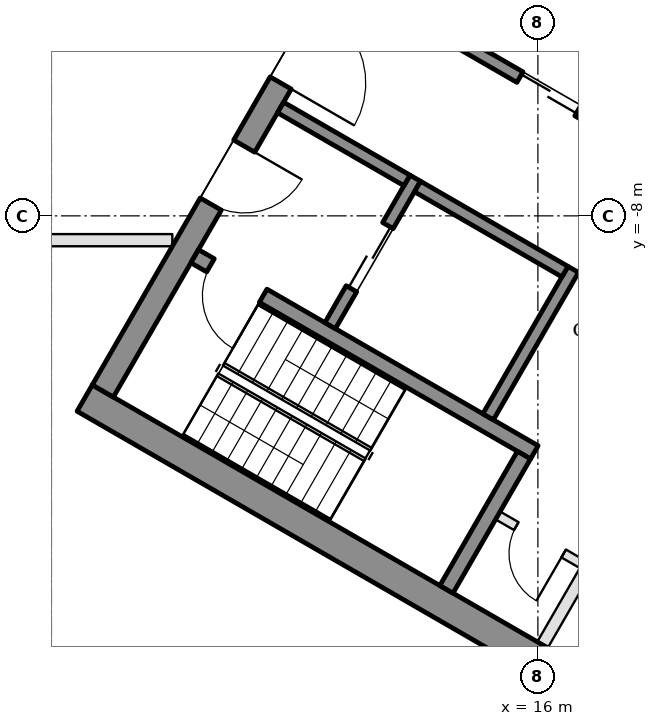
"""IFC4 building model, lengths in metres.
Left out: names, types, materials, properties, quantities, classifications, styles, units other than length and angle.
Written with IfcOpenShell. Run it as: python <this file> out.ifc"""

import sys

from ifc_helpers import new_model, si_unit, direction, frame, frame_2d, origin, place, context, subcontext, project, spatial, rectangle, extrude, element, fill, save


model = new_model("IFC4")
c1 = context("Model", 3, precision=1e-05, world=origin(), true_north=direction((0.0, 1.0)))
c2 = subcontext(c1, "Body", "Model", "MODEL_VIEW")
j1 = project(units=[si_unit("LENGTHUNIT", "METRE"), si_unit("PLANEANGLEUNIT", "RADIAN")], contexts=[c1])
p1 = place(None, origin())
s1 = spatial("IfcSite", under=j1, at=p1, CompositionType="ELEMENT")
p2 = place(p1, origin())
s2 = spatial("IfcBuilding", under=s1, at=p2, CompositionType="ELEMENT")
p3 = place(p2, frame((0.0, 0.0, 120.5)))
s3 = spatial("IfcBuildingStorey", under=s2, at=p3, CompositionType="ELEMENT", Elevation=120.5)
for number, where, z_axis, x_axis in (
    (1, (8.547, -10.997, 0.0), (0.0, 0.0, 1.0), (0.866, -0.5, 0.0)),
    (2, (13.797, -1.903, 0.0), (0.0, 0.0, 1.0), (0.866, -0.5, 0.0)),
):
    element("IfcWall", number, at=place(p3, frame(where, z_axis=z_axis, x_axis=x_axis)), inside=s3, PredefinedType="SHEAR", context=c2, shape_type="SweptSolid", body=[
        extrude(rectangle(XDim=14.837, YDim=0.5, at=frame_2d((7.418, 0.0))), origin(), (0.0, 0.0, 1.0), 3.5),
    ])
p4 = place(p3, frame((8.845, -10.88, 0.0), z_axis=(0.0, 0.0, 1.0), x_axis=(0.500004234368, 0.866022959057, 0.0)))
e3 = element("IfcWall", 3, at=p4, inside=s3, PredefinedType="SHEAR", context=c2, shape_type="SweptSolid", body=[
    extrude(rectangle(XDim=10.0, YDim=0.4, at=frame_2d((5.0, 0.0))), origin(), (0.0, 0.0, 1.0), 3.5),
])
p5 = place(p4, frame((3.55, 0.0, 0.0)))
e4 = element("IfcOpeningElement", 4, at=p5, cuts=e3, PredefinedType="OPENING", context=c2, shape_type="SweptSolid", body=[
    extrude(rectangle(XDim=1.1, YDim=2.1, at=frame_2d((0.55, 1.05))), frame((0.0, 0.21, 0.0), z_axis=(0.0, -1.0, 0.0), x_axis=(1.0, 0.0, 0.0)), (0.0, 0.0, 1.0), 0.42),
])
p6 = place(p4, frame((5.85, 0.0, 0.0)))
e5 = element("IfcOpeningElement", 5, at=p6, cuts=e3, PredefinedType="OPENING", context=c2, shape_type="SweptSolid", body=[
    extrude(rectangle(XDim=1.4, YDim=2.1, at=frame_2d((0.7, 1.05))), frame((0.0, 0.21, 0.0), z_axis=(0.0, -1.0, 0.0), x_axis=(1.0, 0.0, 0.0)), (0.0, 0.0, 1.0), 0.42),
])
p7 = place(p3, frame((10.356, -8.664, 0.0), z_axis=(0.0, 0.0, 1.0), x_axis=(0.866028629588, -0.499994412703, 0.0)))
e6 = element("IfcWall", 6, at=p7, inside=s3, PredefinedType="SHEAR", context=c2, shape_type="SweptSolid", body=[
    extrude(rectangle(XDim=6.45, YDim=0.25, at=frame_2d((3.225, 0.0))), origin(), (0.0, 0.0, 1.0), 3.5),
])
p8 = place(p7, frame((0.3, 0.0, 0.0)))
e7 = element("IfcOpeningElement", 7, at=p8, cuts=e6, PredefinedType="OPENING", context=c2, shape_type="SweptSolid", body=[
    extrude(rectangle(XDim=1.0, YDim=2.1, at=frame_2d((0.5, 1.05))), frame((0.0, 0.135, 0.0), z_axis=(0.0, -1.0, 0.0), x_axis=(1.0, 0.0, 0.0)), (0.0, 0.0, 1.0), 0.27),
])
p9 = place(p3, frame((14.496, -14.143, 0.0), z_axis=(0.0, 0.0, 1.0), x_axis=(0.500062241894, 0.865989465428, 0.0)))
e8 = element("IfcWall", 8, at=p9, inside=s3, PredefinedType="SHEAR", context=c2, shape_type="SweptSolid", body=[
    extrude(rectangle(XDim=2.55, YDim=0.25, at=frame_2d((1.275, 0.0))), origin(), (0.0, 0.0, 1.0), 3.5),
])
p10 = place(p3, frame((15.181, -11.305, 0.0), z_axis=(0.0, 0.0, 1.0), x_axis=(0.49994636267, 0.866056369097, 0.0)))
e9 = element("IfcWall", 9, at=p10, inside=s3, PredefinedType="SHEAR", context=c2, shape_type="SweptSolid", body=[
    extrude(rectangle(XDim=2.8, YDim=0.2, at=frame_2d((1.4, 0.0))), origin(), (0.0, 0.0, 1.0), 3.5),
])
p11 = place(p3, frame((12.583, -9.805, 0.0), z_axis=(0.0, 0.0, 1.0), x_axis=(0.49994636267, 0.866056369097, 0.0)))
e10 = element("IfcWall", 10, at=p11, inside=s3, PredefinedType="SHEAR", context=c2, shape_type="SweptSolid", body=[
    extrude(rectangle(XDim=2.8, YDim=0.2, at=frame_2d((1.4, 0.0))), origin(), (0.0, 0.0, 1.0), 3.5),
])
p12 = place(p11, frame((0.7, 0.0, 0.0)))
e11 = element("IfcOpeningElement", 11, at=p12, cuts=e10, PredefinedType="OPENING", context=c2, shape_type="SweptSolid", body=[
    extrude(rectangle(XDim=1.2, YDim=2.1, at=frame_2d((0.6, 1.05))), frame((0.0, 0.11, 0.0), z_axis=(0.0, -1.0, 0.0), x_axis=(1.0, 0.0, 0.0)), (0.0, 0.0, 1.0), 0.22),
])
p13 = place(p3, frame((11.768, -6.217, 0.0), z_axis=(0.0, 0.0, 1.0), x_axis=(0.866050077142, -0.499957262057, 0.0)))
e12 = element("IfcWall", 12, at=p13, inside=s3, PredefinedType="SHEAR", context=c2, shape_type="SweptSolid", body=[
    extrude(rectangle(XDim=2.4, YDim=0.2, at=frame_2d((1.2, 0.0))), origin(), (0.0, 0.0, 1.0), 3.5),
])
p14 = place(p3, frame((14.02, -7.517, 0.0), z_axis=(0.0, 0.0, 1.0), x_axis=(0.866034573852, -0.49998411664, 0.0)))
e13 = element("IfcWall", 13, at=p14, inside=s3, PredefinedType="SHEAR", context=c2, shape_type="SweptSolid", body=[
    extrude(rectangle(XDim=2.8, YDim=0.2, at=frame_2d((1.4, 0.0))), origin(), (0.0, 0.0, 1.0), 3.5),
])
p15 = place(p3, frame((12.968, -4.138, 0.0), z_axis=(0.0, 0.0, 1.0), x_axis=(0.866028328073, -0.49999493495, 0.0)))
e14 = element("IfcWall", 14, at=p15, inside=s3, PredefinedType="SHEAR", context=c2, shape_type="SweptSolid", body=[
    extrude(rectangle(XDim=10.16, YDim=0.2, at=frame_2d((5.08, 0.0))), origin(), (0.0, 0.0, 1.0), 3.5),
])
p16 = place(p15, frame((0.62, 0.0, 0.0)))
e15 = element("IfcOpeningElement", 15, at=p16, cuts=e14, PredefinedType="OPENING", context=c2, shape_type="SweptSolid", body=[
    extrude(rectangle(XDim=1.1, YDim=2.1, at=frame_2d((0.55, 1.05))), frame((0.0, 0.11, 0.0), z_axis=(0.0, -1.0, 0.0), x_axis=(1.0, 0.0, 0.0)), (0.0, 0.0, 1.0), 0.22),
])
p17 = place(p15, frame((3.16, 0.0, 0.0)))
e16 = element("IfcOpeningElement", 16, at=p17, cuts=e14, PredefinedType="OPENING", context=c2, shape_type="SweptSolid", body=[
    extrude(rectangle(XDim=1.1, YDim=2.1, at=frame_2d((0.55, 1.05))), frame((0.0, 0.11, 0.0), z_axis=(0.0, -1.0, 0.0), x_axis=(1.0, 0.0, 0.0)), (0.0, 0.0, 1.0), 0.22),
])
p18 = place(p15, frame((5.7, 0.0, 0.0)))
e17 = element("IfcOpeningElement", 17, at=p18, cuts=e14, PredefinedType="OPENING", context=c2, shape_type="SweptSolid", body=[
    extrude(rectangle(XDim=1.1, YDim=2.1, at=frame_2d((0.55, 1.05))), frame((0.0, 0.11, 0.0), z_axis=(0.0, -1.0, 0.0), x_axis=(1.0, 0.0, 0.0)), (0.0, 0.0, 1.0), 0.22),
])
p19 = place(p15, frame((8.24, 0.0, 0.0)))
e18 = element("IfcOpeningElement", 18, at=p19, cuts=e14, PredefinedType="OPENING", context=c2, shape_type="SweptSolid", body=[
    extrude(rectangle(XDim=1.1, YDim=2.1, at=frame_2d((0.55, 1.05))), frame((0.0, 0.11, 0.0), z_axis=(0.0, -1.0, 0.0), x_axis=(1.0, 0.0, 0.0)), (0.0, 0.0, 1.0), 0.22),
])
p20 = place(p3, frame((15.131, -5.272, 0.0), z_axis=(0.0, 0.0, 1.0), x_axis=(0.499972520799, 0.866041268327, 0.0)))
e19 = element("IfcWall", 19, at=p20, inside=s3, PredefinedType="SHEAR", context=c2, shape_type="SweptSolid", body=[
    extrude(rectangle(XDim=2.0, YDim=0.2, at=frame_2d((1.0, 0.0))), origin(), (0.0, 0.0, 1.0), 3.5),
])
p21 = place(p3, frame((16.076, -15.055, 0.0), z_axis=(0.0, 0.0, 1.0), x_axis=(0.499995103361, 0.866028230842, 0.0)))
e20 = element("IfcWall", 20, at=p21, inside=s3, PredefinedType="PARTITIONING", context=c2, shape_type="SweptSolid", body=[
    extrude(rectangle(XDim=5.4, YDim=0.2, at=frame_2d((2.7, 0.0))), origin(), (0.0, 0.0, 1.0), 3.5),
])
p22 = place(p21, frame((1.913, 0.0, 0.0)))
e21 = element("IfcOpeningElement", 21, at=p22, cuts=e20, PredefinedType="OPENING", context=c2, shape_type="SweptSolid", body=[
    extrude(rectangle(XDim=0.9, YDim=2.1, at=frame_2d((0.45, 1.05))), frame((0.0, 0.11, 0.0), z_axis=(0.0, -1.0, 0.0), x_axis=(1.0, 0.0, 0.0)), (0.0, 0.0, 1.0), 0.22),
])
p23 = place(p21, frame((3.788, 0.0, 0.0)))
e22 = element("IfcOpeningElement", 22, at=p23, cuts=e20, PredefinedType="OPENING", context=c2, shape_type="SweptSolid", body=[
    extrude(rectangle(XDim=0.9, YDim=2.1, at=frame_2d((0.45, 1.05))), frame((0.0, 0.11, 0.0), z_axis=(0.0, -1.0, 0.0), x_axis=(1.0, 0.0, 0.0)), (0.0, 0.0, 1.0), 0.22),
])
p24 = place(p3, frame((15.342, -12.928, 0.0), z_axis=(0.0, 0.0, 1.0), x_axis=(0.865989903783, -0.500061482766, 0.0)))
e23 = element("IfcWall", 23, at=p24, inside=s3, PredefinedType="PARTITIONING", context=c2, shape_type="SweptSolid", body=[
    extrude(rectangle(XDim=1.6, YDim=0.15, at=frame_2d((0.8, 0.0))), origin(), (0.0, 0.0, 1.0), 3.5),
])
p25 = place(p24, frame((0.35, 0.0, 0.0)))
e24 = element("IfcOpeningElement", 24, at=p25, cuts=e23, PredefinedType="OPENING", context=c2, shape_type="SweptSolid", body=[
    extrude(rectangle(XDim=0.9, YDim=2.1, at=frame_2d((0.45, 1.05))), frame((0.0, 0.085, 0.0), z_axis=(0.0, -1.0, 0.0), x_axis=(1.0, 0.0, 0.0)), (0.0, 0.0, 1.0), 0.17),
])
p26 = place(p3, frame((9.988, -8.4, 0.0), z_axis=(0.0, 0.0, 1.0), x_axis=(-1.0, 0.0, 0.0)))
e25 = element("IfcWall", 25, at=p26, inside=s3, PredefinedType="PARTITIONING", context=c2, shape_type="SweptSolid", body=[
    extrude(rectangle(XDim=9.989, YDim=0.2, at=frame_2d((4.995, 0.0))), origin(), (0.0, 0.0, 1.0), 2.95),
])
p27 = place(p26, frame((4.495, 0.0, 0.0)))
e26 = element("IfcOpeningElement", 26, at=p27, cuts=e25, PredefinedType="OPENING", context=c2, shape_type="SweptSolid", body=[
    extrude(rectangle(XDim=1.0, YDim=2.1, at=frame_2d((0.5, 1.05))), frame((0.0, 0.11, 0.0), z_axis=(0.0, -1.0, 0.0), x_axis=(1.0, 0.0, 0.0)), (0.0, 0.0, 1.0), 0.22),
])
p28 = place(p12, origin())
e27 = element("IfcDoor", 27, at=p28, inside=s3, OperationType="DOUBLE_DOOR_SLIDING", PredefinedType="DOOR", context=c2, shape_type="SweptSolid", body=[
    extrude(rectangle(XDim=1.2, YDim=2.1, at=frame_2d((0.6, 1.05))), frame((0.0, 0.025, 0.0), z_axis=(0.0, -1.0, 0.0), x_axis=(1.0, 0.0, 0.0)), (0.0, 0.0, 1.0), 0.05),
])
fill(e11, e27)
p29 = place(p25, frame((0.9, 0.0, 0.0), z_axis=(0.0, 0.0, 1.0), x_axis=(-1.0, 0.0, 0.0)))
e28 = element("IfcDoor", 28, at=p29, inside=s3, OperationType="SINGLE_SWING_LEFT", PredefinedType="DOOR", context=c2, shape_type="SweptSolid", body=[
    extrude(rectangle(XDim=0.9, YDim=2.1, at=frame_2d((0.45, 1.05))), frame((0.0, 0.025, 0.0), z_axis=(0.0, -1.0, 0.0), x_axis=(1.0, 0.0, 0.0)), (0.0, 0.0, 1.0), 0.05),
])
fill(e24, e28)
p30 = place(p17, origin())
e29 = element("IfcDoor", 29, at=p30, inside=s3, OperationType="DOUBLE_DOOR_SLIDING", PredefinedType="DOOR", context=c2, shape_type="SweptSolid", body=[
    extrude(rectangle(XDim=1.1, YDim=2.1, at=frame_2d((0.55, 1.05))), frame((0.0, 0.025, 0.0), z_axis=(0.0, -1.0, 0.0), x_axis=(1.0, 0.0, 0.0)), (0.0, 0.0, 1.0), 0.05),
])
fill(e16, e29)
p31 = place(p5, frame((1.1, 0.0, 0.0), z_axis=(0.0, 0.0, 1.0), x_axis=(-1.0, 0.0, 0.0)))
e30 = element("IfcDoor", 30, at=p31, inside=s3, OperationType="SINGLE_SWING_LEFT", PredefinedType="DOOR", context=c2, shape_type="SweptSolid", body=[
    extrude(rectangle(XDim=1.1, YDim=2.1, at=frame_2d((0.55, 1.05))), frame((0.0, 0.025, 0.0), z_axis=(0.0, -1.0, 0.0), x_axis=(1.0, 0.0, 0.0)), (0.0, 0.0, 1.0), 0.05),
])
fill(e4, e30)
p32 = place(p6, frame((1.4, 0.0, 0.0), z_axis=(0.0, 0.0, 1.0), x_axis=(-1.0, 0.0, 0.0)))
e31 = element("IfcDoor", 31, at=p32, inside=s3, OperationType="DOUBLE_DOOR_SINGLE_SWING", PredefinedType="DOOR", context=c2, shape_type="SweptSolid", body=[
    extrude(rectangle(XDim=1.4, YDim=2.1, at=frame_2d((0.7, 1.05))), frame((0.0, 0.025, 0.0), z_axis=(0.0, -1.0, 0.0), x_axis=(1.0, 0.0, 0.0)), (0.0, 0.0, 1.0), 0.05),
])
fill(e5, e31)
p33 = place(p8, frame((1.0, 0.0, 0.0), z_axis=(0.0, 0.0, 1.0), x_axis=(-1.0, 0.0, 0.0)))
e32 = element("IfcDoor", 32, at=p33, inside=s3, OperationType="SINGLE_SWING_LEFT", PredefinedType="DOOR", context=c2, shape_type="SweptSolid", body=[
    extrude(rectangle(XDim=1.0, YDim=2.1, at=frame_2d((0.5, 1.05))), frame((0.0, 0.025, 0.0), z_axis=(0.0, -1.0, 0.0), x_axis=(1.0, 0.0, 0.0)), (0.0, 0.0, 1.0), 0.05),
])
fill(e7, e32)
save(model, sys.argv[1])
